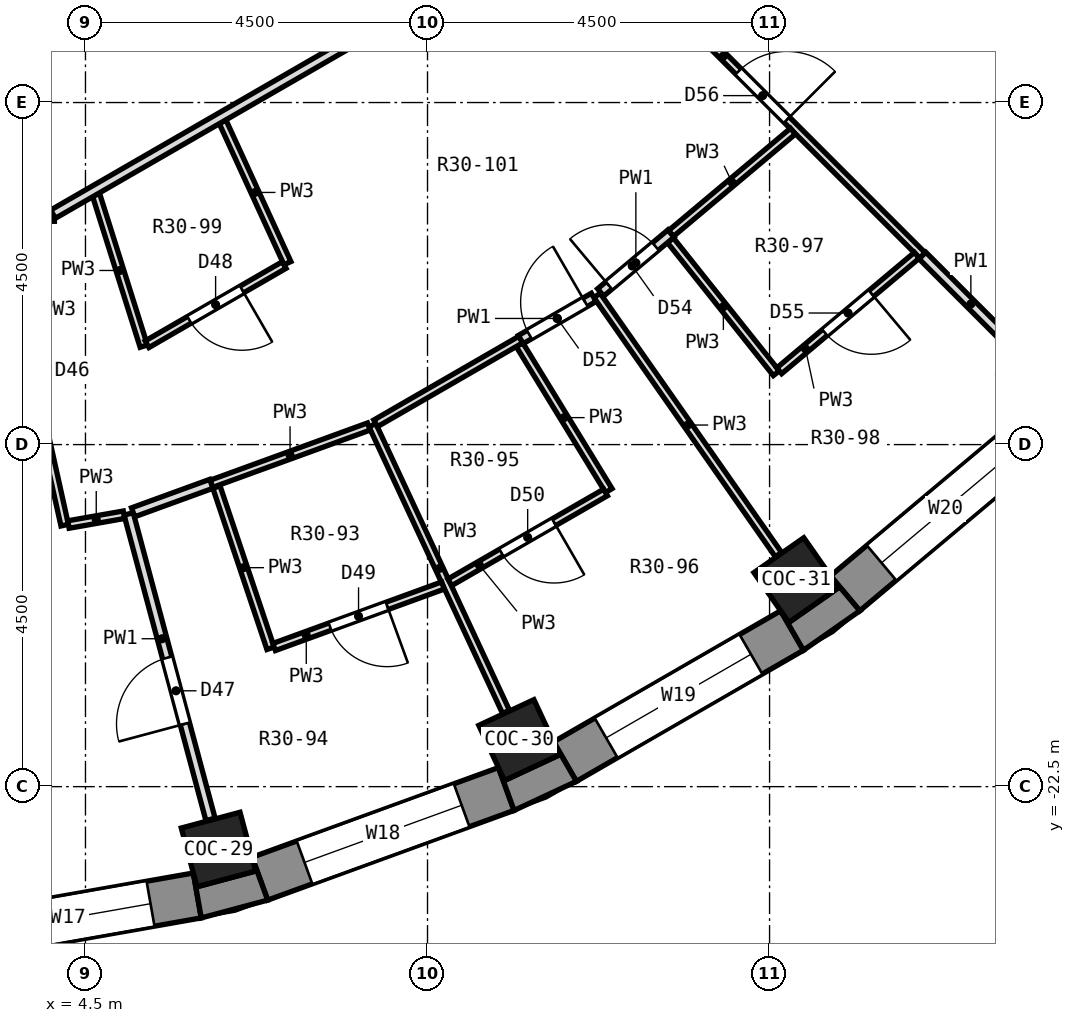
"""IFC4 building model, lengths in metres.
Left out: names, types, materials, properties, quantities, classifications, styles, units other than length and angle.
Written with IfcOpenShell. Run it as: python <this file> out.ifc"""

import sys

from ifc_helpers import new_model, si_unit, direction, frame, frame_2d, origin, origin_2d, place, context, subcontext, project, spatial, polyline, rectangle, outline, extrude, element, fill, save


model = new_model("IFC4")
c1 = context("Model", 3, precision=1e-05, world=origin(), true_north=direction((0.0, 1.0)))
c2 = subcontext(c1, "Body", "Model", "MODEL_VIEW")
j1 = project(units=[si_unit("LENGTHUNIT", "METRE"), si_unit("PLANEANGLEUNIT", "RADIAN")], contexts=[c1])
p1 = place(None, origin())
s1 = spatial("IfcSite", under=j1, at=p1, CompositionType="ELEMENT")
p2 = place(p1, origin())
s2 = spatial("IfcBuilding", under=s1, at=p2, CompositionType="ELEMENT")
p3 = place(p2, frame((0.0, 0.0, 210.3)))
s3 = spatial("IfcBuildingStorey", under=s2, at=p3, CompositionType="ELEMENT", Elevation=210.3)
for number, where, z_axis, x_axis in (
    (1, (6.25, -23.327, 0.0), (0.0, 0.0, 1.0), (0.259, -0.966, 0.0)),
    (2, (10.206, -21.887, 0.0), (0.0, 0.0, 1.0), (0.423, -0.906, 0.0)),
    (3, (13.852, -19.782, 0.0), (0.0, 0.0, 1.0), (0.574, -0.819, 0.0)),
):
    element("IfcColumn", number, at=place(p3, frame(where, z_axis=z_axis, x_axis=x_axis)), inside=s3, PredefinedType="COLUMN", context=c2, shape_type="SweptSolid", body=[
        extrude(rectangle(XDim=0.8, YDim=0.8, at=origin_2d()), origin(), (0.0, 0.0, 1.0), 3.3),
    ])
p4 = place(p3, frame((2.574, -24.531, 0.0), z_axis=(0.0, 0.0, 1.0), x_axis=(0.984814892183, 0.173607684551, 0.0)))
e4 = element("IfcWall", 4, at=p4, inside=s3, PredefinedType="SOLIDWALL", context=c2, shape_type="SweptSolid", body=[
    extrude(rectangle(XDim=3.45, YDim=0.6, at=frame_2d((1.725, 0.0))), origin(), (0.0, 0.0, 1.0), 2.85),
])
p5 = place(p4, frame((0.625, 0.0, 0.9)))
e5 = element("IfcOpeningElement", 5, at=p5, cuts=e4, PredefinedType="OPENING", context=c2, shape_type="SweptSolid", body=[
    extrude(rectangle(XDim=2.2, YDim=1.8, at=frame_2d((1.1, 0.9))), frame((0.0, 0.312, 0.0), z_axis=(0.0, -1.0, 0.0), x_axis=(1.0, 0.0, 0.0)), (0.0, 0.0, 1.0), 0.624),
])
p6 = place(p3, frame((6.794, -23.711, 0.0), z_axis=(0.0, 0.0, 1.0), x_axis=(0.93968799822, 0.342032843455, 0.0)))
e6 = element("IfcWall", 6, at=p6, inside=s3, PredefinedType="SOLIDWALL", context=c2, shape_type="SweptSolid", body=[
    extrude(rectangle(XDim=3.45, YDim=0.6, at=frame_2d((1.725, 0.0))), origin(), (0.0, 0.0, 1.0), 2.85),
])
p7 = place(p6, frame((0.625, 0.0, 0.9)))
e7 = element("IfcOpeningElement", 7, at=p7, cuts=e6, PredefinedType="OPENING", context=c2, shape_type="SweptSolid", body=[
    extrude(rectangle(XDim=2.2, YDim=1.8, at=frame_2d((1.1, 0.9))), frame((0.0, 0.312, 0.0), z_axis=(0.0, -1.0, 0.0), x_axis=(1.0, 0.0, 0.0)), (0.0, 0.0, 1.0), 0.624),
])
p8 = place(p3, frame((10.809, -22.171, 0.0), z_axis=(0.0, 0.0, 1.0), x_axis=(0.86602648383, 0.499998129301, 0.0)))
e8 = element("IfcWall", 8, at=p8, inside=s3, PredefinedType="SOLIDWALL", context=c2, shape_type="SweptSolid", body=[
    extrude(rectangle(XDim=3.45, YDim=0.6, at=frame_2d((1.725, 0.0))), origin(), (0.0, 0.0, 1.0), 2.85),
])
p9 = place(p8, frame((0.625, 0.0, 0.9)))
e9 = element("IfcOpeningElement", 9, at=p9, cuts=e8, PredefinedType="OPENING", context=c2, shape_type="SweptSolid", body=[
    extrude(rectangle(XDim=2.2, YDim=1.8, at=frame_2d((1.1, 0.9))), frame((0.0, 0.312, 0.0), z_axis=(0.0, -1.0, 0.0), x_axis=(1.0, 0.0, 0.0)), (0.0, 0.0, 1.0), 0.624),
])
p10 = place(p3, frame((14.494, -19.957, 0.0), z_axis=(0.0, 0.0, 1.0), x_axis=(0.766058884809, 0.642770398358, 0.0)))
e10 = element("IfcWall", 10, at=p10, inside=s3, PredefinedType="SOLIDWALL", context=c2, shape_type="SweptSolid", body=[
    extrude(rectangle(XDim=3.449, YDim=0.6, at=frame_2d((1.725, 0.0))), origin(), (0.0, 0.0, 1.0), 2.85),
])
p11 = place(p10, frame((0.625, 0.0, 0.9)))
e11 = element("IfcOpeningElement", 11, at=p11, cuts=e10, PredefinedType="OPENING", context=c2, shape_type="SweptSolid", body=[
    extrude(rectangle(XDim=2.2, YDim=1.8, at=frame_2d((1.1, 0.9))), frame((0.0, 0.312, 0.0), z_axis=(0.0, -1.0, 0.0), x_axis=(1.0, 0.0, 0.0)), (0.0, 0.0, 1.0), 0.624),
])
p12 = place(p3, origin())
e12 = element("IfcWall", 12, at=p12, inside=s3, PredefinedType="SOLIDWALL", context=c2, shape_type="SweptSolid", body=[
    extrude(outline(polyline([(6.023, -24.227), (6.897, -23.993), (6.692, -23.429), (6.74, -23.61), (5.968, -23.817), (5.919, -23.636), (6.023, -24.227)])), origin(), (0.0, 0.0, 1.0), 2.85),
])
p13 = place(p3, origin())
e13 = element("IfcWall", 13, at=p13, inside=s3, PredefinedType="SOLIDWALL", context=c2, shape_type="SweptSolid", body=[
    extrude(outline(polyline([(10.959, -22.431), (10.659, -21.911), (10.738, -22.081), (10.013, -22.419), (9.934, -22.249), (10.139, -22.813), (10.959, -22.431)])), origin(), (0.0, 0.0, 1.0), 2.85),
])
p14 = place(p3, origin())
e14 = element("IfcWall", 14, at=p14, inside=s3, PredefinedType="SOLIDWALL", context=c2, shape_type="SweptSolid", body=[
    extrude(outline(polyline([(13.946, -20.706), (14.687, -20.187), (14.302, -19.727), (14.409, -19.881), (13.754, -20.34), (13.646, -20.186), (13.946, -20.706)])), origin(), (0.0, 0.0, 1.0), 2.85),
])
p15 = place(p3, frame((3.338, -15.061, 0.0), z_axis=(0.0, 0.0, 1.0), x_axis=(0.216772684832, -0.976222107469, 0.0)))
e15 = element("IfcWall", 15, at=p15, inside=s3, PredefinedType="PARTITIONING", context=c2, shape_type="SweptSolid", body=[
    extrude(rectangle(XDim=4.096, YDim=0.1, at=frame_2d((2.048, 0.0))), origin(), (0.0, 0.0, 1.0), 2.85),
])
p16 = place(p15, frame((1.566, 0.0, 0.0)))
e16 = element("IfcOpeningElement", 16, at=p16, cuts=e15, PredefinedType="OPENING", context=c2, shape_type="SweptSolid", body=[
    extrude(rectangle(XDim=0.9, YDim=2.1, at=frame_2d((0.45, 1.05))), frame((0.0, 0.062, 0.0), z_axis=(0.0, -1.0, 0.0), x_axis=(1.0, 0.0, 0.0)), (0.0, 0.0, 1.0), 0.124),
])
p17 = place(p3, frame((5.068, -18.912, 0.0), z_axis=(0.0, 0.0, 1.0), x_axis=(0.258780082079, -0.965936265557, 0.0)))
e17 = element("IfcWall", 17, at=p17, inside=s3, PredefinedType="PARTITIONING", context=c2, shape_type="SweptSolid", body=[
    extrude(rectangle(XDim=4.16, YDim=0.125, at=frame_2d((2.08, 0.0))), origin(), (0.0, 0.0, 1.0), 2.85),
])
p18 = place(p17, frame((1.959, 0.0, 0.0)))
e18 = element("IfcOpeningElement", 18, at=p18, cuts=e17, PredefinedType="OPENING", context=c2, shape_type="SweptSolid", body=[
    extrude(rectangle(XDim=0.9, YDim=2.1, at=frame_2d((0.45, 1.05))), frame((0.0, 0.074, 0.0), z_axis=(0.0, -1.0, 0.0), x_axis=(1.0, 0.0, 0.0)), (0.0, 0.0, 1.0), 0.149),
])
p19 = place(p3, frame((4.639, -14.713, 0.0), z_axis=(0.0, 0.0, 1.0), x_axis=(0.300689491928, -0.953722092354, 0.0)))
e19 = element("IfcWall", 19, at=p19, inside=s3, PredefinedType="PARTITIONING", context=c2, shape_type="SweptSolid", body=[
    extrude(rectangle(XDim=2.089, YDim=0.1, at=frame_2d((1.044, 0.0))), origin(), (0.0, 0.0, 1.0), 2.85),
])
p20 = place(p3, frame((6.223, -18.558, 0.0), z_axis=(0.0, 0.0, 1.0), x_axis=(0.318223462583, -0.948015731864, 0.0)))
e20 = element("IfcWall", 20, at=p20, inside=s3, PredefinedType="PARTITIONING", context=c2, shape_type="SweptSolid", body=[
    extrude(rectangle(XDim=2.238, YDim=0.1, at=frame_2d((1.119, 0.0))), origin(), (0.0, 0.0, 1.0), 2.85),
])
p21 = place(p3, frame((6.304, -13.753, 0.0), z_axis=(0.0, 0.0, 1.0), x_axis=(0.41684777826, -0.90897630869, 0.0)))
e21 = element("IfcWall", 21, at=p21, inside=s3, PredefinedType="PARTITIONING", context=c2, shape_type="SweptSolid", body=[
    extrude(rectangle(XDim=2.046, YDim=0.1, at=frame_2d((1.023, 0.0))), origin(), (0.0, 0.0, 1.0), 2.85),
])
p22 = place(p3, frame((8.275, -17.745, 0.0), z_axis=(0.0, 0.0, 1.0), x_axis=(0.42246777717, -0.906377943936, 0.0)))
e22 = element("IfcWall", 22, at=p22, inside=s3, PredefinedType="PARTITIONING", context=c2, shape_type="SweptSolid", body=[
    extrude(rectangle(XDim=4.16, YDim=0.1, at=frame_2d((2.08, 0.0))), origin(), (0.0, 0.0, 1.0), 2.85),
])
p23 = place(p3, frame((10.21, -16.686, 0.0), z_axis=(0.0, 0.0, 1.0), x_axis=(0.522037907824, -0.852922284147, 0.0)))
e23 = element("IfcWall", 23, at=p23, inside=s3, PredefinedType="PARTITIONING", context=c2, shape_type="SweptSolid", body=[
    extrude(rectangle(XDim=2.25, YDim=0.1, at=frame_2d((1.125, 0.0))), origin(), (0.0, 0.0, 1.0), 2.85),
])
p24 = place(p3, frame((11.23, -16.038, 0.0), z_axis=(0.0, 0.0, 1.0), x_axis=(0.573525346877, -0.81918781515, 0.0)))
e24 = element("IfcWall", 24, at=p24, inside=s3, PredefinedType="PARTITIONING", context=c2, shape_type="SweptSolid", body=[
    extrude(rectangle(XDim=4.161, YDim=0.1, at=frame_2d((2.081, 0.0))), origin(), (0.0, 0.0, 1.0), 2.85),
])
p25 = place(p3, frame((12.195, -15.311, 0.0), z_axis=(0.0, 0.0, 1.0), x_axis=(0.623070217722, -0.782165905539, 0.0)))
e25 = element("IfcWall", 25, at=p25, inside=s3, PredefinedType="PARTITIONING", context=c2, shape_type="SweptSolid", body=[
    extrude(rectangle(XDim=2.237, YDim=0.1, at=frame_2d((1.119, 0.0))), origin(), (0.0, 0.0, 1.0), 2.85),
])
p26 = place(p3, frame((10.981, -10.981, 0.0), z_axis=(0.0, 0.0, 1.0), x_axis=(0.707106781187, -0.707106781187, 0.0)))
e26 = element("IfcWall", 26, at=p26, inside=s3, PredefinedType="PARTITIONING", context=c2, shape_type="SweptSolid", body=[
    extrude(rectangle(XDim=6.408, YDim=0.1, at=frame_2d((3.204, 0.0))), origin(), (0.0, 0.0, 1.0), 2.85),
])
p27 = place(p26, frame((2.984, 0.0, 0.0)))
e27 = element("IfcOpeningElement", 27, at=p27, cuts=e26, PredefinedType="OPENING", context=c2, shape_type="SweptSolid", body=[
    extrude(rectangle(XDim=0.9, YDim=2.1, at=frame_2d((0.45, 1.05))), frame((0.0, 0.062, 0.0), z_axis=(0.0, -1.0, 0.0), x_axis=(1.0, 0.0, 0.0)), (0.0, 0.0, 1.0), 0.124),
])
p28 = place(p3, frame((15.511, -15.513, 0.0), z_axis=(0.0, 0.0, 1.0), x_axis=(0.707106781187, -0.707106781187, 0.0)))
e28 = element("IfcWall", 28, at=p28, inside=s3, PredefinedType="PARTITIONING", context=c2, shape_type="SweptSolid", body=[
    extrude(rectangle(XDim=1.802, YDim=0.125, at=frame_2d((0.901, 0.0))), origin(), (0.0, 0.0, 1.0), 2.85),
])
p29 = place(p3, frame((-3.957, -15.0, 0.0), z_axis=(0.0, 0.0, 1.0), x_axis=(1.0, 0.0, 0.0)))
e29 = element("IfcWall", 29, at=p29, inside=s3, PredefinedType="PARTITIONING", context=c2, shape_type="SweptSolid", body=[
    extrude(rectangle(XDim=8.048, YDim=0.125, at=frame_2d((4.024, 0.0))), origin(), (0.0, 0.0, 1.0), 2.85),
])
p30 = place(p29, frame((4.463, 0.0, 0.0)))
e30 = element("IfcOpeningElement", 30, at=p30, cuts=e29, PredefinedType="OPENING", context=c2, shape_type="SweptSolid", body=[
    extrude(rectangle(XDim=1.0, YDim=2.1, at=frame_2d((0.5, 1.05))), frame((0.0, 0.074, 0.0), z_axis=(0.0, -1.0, 0.0), x_axis=(1.0, 0.0, 0.0)), (0.0, 0.0, 1.0), 0.149),
])
p31 = place(p3, frame((4.276, -19.052, 0.0), z_axis=(0.0, 0.0, 1.0), x_axis=(0.984820011125, 0.173578644101, 0.0)))
e31 = element("IfcWall", 31, at=p31, inside=s3, PredefinedType="PARTITIONING", context=c2, shape_type="SweptSolid", body=[
    extrude(rectangle(XDim=0.741, YDim=0.1, at=frame_2d((0.371, 0.0))), origin(), (0.0, 0.0, 1.0), 2.85),
])
p32 = place(p3, frame((6.982, -20.663, 0.0), z_axis=(0.0, 0.0, 1.0), x_axis=(0.939639539443, 0.34216594792, 0.0)))
e32 = element("IfcWall", 32, at=p32, inside=s3, PredefinedType="PARTITIONING", context=c2, shape_type="SweptSolid", body=[
    extrude(rectangle(XDim=2.364, YDim=0.1, at=frame_2d((1.182, 0.0))), origin(), (0.0, 0.0, 1.0), 2.85),
])
p33 = place(p32, frame((0.782, 0.0, 0.0)))
e33 = element("IfcOpeningElement", 33, at=p33, cuts=e32, PredefinedType="OPENING", context=c2, shape_type="SweptSolid", body=[
    extrude(rectangle(XDim=0.8, YDim=2.1, at=frame_2d((0.4, 1.05))), frame((0.0, 0.062, 0.0), z_axis=(0.0, -1.0, 0.0), x_axis=(1.0, 0.0, 0.0)), (0.0, 0.0, 1.0), 0.124),
])
p34 = place(p3, frame((6.156, -18.516, 0.0), z_axis=(0.0, 0.0, 1.0), x_axis=(0.939728749343, 0.341920864613, 0.0)))
e34 = element("IfcWall", 34, at=p34, inside=s3, PredefinedType="PARTITIONING", context=c2, shape_type="SweptSolid", body=[
    extrude(rectangle(XDim=2.205, YDim=0.1, at=frame_2d((1.103, 0.0))), origin(), (0.0, 0.0, 1.0), 2.85),
])
p35 = place(p3, frame((5.127, -18.891, 0.0), z_axis=(0.0, 0.0, 1.0), x_axis=(0.939656692784, 0.342118838573, 0.0)))
e35 = element("IfcWall", 35, at=p35, inside=s3, PredefinedType="PARTITIONING", context=c2, shape_type="SweptSolid", body=[
    extrude(rectangle(XDim=1.095, YDim=0.125, at=frame_2d((0.548, 0.0))), origin(), (0.0, 0.0, 1.0), 2.85),
])
p36 = place(p3, frame((9.293, -19.812, 0.0), z_axis=(0.0, 0.0, 1.0), x_axis=(0.866139183788, 0.49980287545, 0.0)))
e36 = element("IfcWall", 36, at=p36, inside=s3, PredefinedType="PARTITIONING", context=c2, shape_type="SweptSolid", body=[
    extrude(rectangle(XDim=2.365, YDim=0.1, at=frame_2d((1.183, 0.0))), origin(), (0.0, 0.0, 1.0), 2.85),
])
p37 = place(p36, frame((0.782, 0.0, 0.0)))
e37 = element("IfcOpeningElement", 37, at=p37, cuts=e36, PredefinedType="OPENING", context=c2, shape_type="SweptSolid", body=[
    extrude(rectangle(XDim=0.8, YDim=2.1, at=frame_2d((0.4, 1.05))), frame((0.0, 0.062, 0.0), z_axis=(0.0, -1.0, 0.0), x_axis=(1.0, 0.0, 0.0)), (0.0, 0.0, 1.0), 0.124),
])
p38 = place(p3, frame((8.318, -17.72, 0.0), z_axis=(0.0, 0.0, 1.0), x_axis=(0.866039875853, 0.499974932805, 0.0)))
e38 = element("IfcWall", 38, at=p38, inside=s3, PredefinedType="PARTITIONING", context=c2, shape_type="SweptSolid", body=[
    extrude(rectangle(XDim=2.204, YDim=0.1, at=frame_2d((1.102, 0.0))), origin(), (0.0, 0.0, 1.0), 2.85),
])
p39 = place(p3, frame((10.227, -16.618, 0.0), z_axis=(0.0, 0.0, 1.0), x_axis=(0.865642357341, 0.50066286978, 0.0)))
e39 = element("IfcWall", 39, at=p39, inside=s3, PredefinedType="PARTITIONING", context=c2, shape_type="SweptSolid", body=[
    extrude(rectangle(XDim=1.108, YDim=0.125, at=frame_2d((0.554, 0.0))), origin(), (0.0, 0.0, 1.0), 2.85),
])
p40 = place(p39, frame((0.129, 0.0, 0.0)))
e40 = element("IfcOpeningElement", 40, at=p40, cuts=e39, PredefinedType="OPENING", context=c2, shape_type="SweptSolid", body=[
    extrude(rectangle(XDim=0.85, YDim=2.1, at=frame_2d((0.425, 1.05))), frame((0.0, 0.074, 0.0), z_axis=(0.0, -1.0, 0.0), x_axis=(1.0, 0.0, 0.0)), (0.0, 0.0, 1.0), 0.149),
])
p41 = place(p3, frame((5.31, -16.68, 0.0), z_axis=(0.0, 0.0, 1.0), x_axis=(0.865867329874, 0.500273692149, 0.0)))
e41 = element("IfcWall", 41, at=p41, inside=s3, PredefinedType="PARTITIONING", context=c2, shape_type="SweptSolid", body=[
    extrude(rectangle(XDim=2.083, YDim=0.1, at=frame_2d((1.042, 0.0))), origin(), (0.0, 0.0, 1.0), 2.85),
])
p42 = place(p41, frame((0.641, 0.0, 0.0)))
e42 = element("IfcOpeningElement", 42, at=p42, cuts=e41, PredefinedType="OPENING", context=c2, shape_type="SweptSolid", body=[
    extrude(rectangle(XDim=0.8, YDim=2.1, at=frame_2d((0.4, 1.05))), frame((0.0, 0.062, 0.0), z_axis=(0.0, -1.0, 0.0), x_axis=(1.0, 0.0, 0.0)), (0.0, 0.0, 1.0), 0.124),
])
p43 = place(p3, frame((4.073, -14.969, 0.0), z_axis=(0.0, 0.0, 1.0), x_axis=(0.866056845741, 0.499945536979, 0.0)))
e43 = element("IfcWall", 43, at=p43, inside=s3, PredefinedType="PARTITIONING", context=c2, shape_type="SweptSolid", body=[
    extrude(rectangle(XDim=7.926, YDim=0.125, at=frame_2d((3.963, 0.0))), origin(), (0.0, 0.0, 1.0), 2.85),
])
p44 = place(p3, frame((11.278, -15.998, 0.0), z_axis=(0.0, 0.0, 1.0), x_axis=(0.766877941262, 0.641792975348, 0.0)))
e44 = element("IfcWall", 44, at=p44, inside=s3, PredefinedType="PARTITIONING", context=c2, shape_type="SweptSolid", body=[
    extrude(rectangle(XDim=1.208, YDim=0.125, at=frame_2d((0.604, 0.0))), origin(), (0.0, 0.0, 1.0), 2.85),
])
p45 = place(p44, frame((0.142, 0.0, 0.0)))
e45 = element("IfcOpeningElement", 45, at=p45, cuts=e44, PredefinedType="OPENING", context=c2, shape_type="SweptSolid", body=[
    extrude(rectangle(XDim=0.8, YDim=2.1, at=frame_2d((0.4, 1.05))), frame((0.0, 0.074, 0.0), z_axis=(0.0, -1.0, 0.0), x_axis=(1.0, 0.0, 0.0)), (0.0, 0.0, 1.0), 0.149),
])
p46 = place(p3, frame((13.627, -17.029, 0.0), z_axis=(0.0, 0.0, 1.0), x_axis=(0.766091436164, 0.642731601399, 0.0)))
e46 = element("IfcWall", 46, at=p46, inside=s3, PredefinedType="PARTITIONING", context=c2, shape_type="SweptSolid", body=[
    extrude(rectangle(XDim=2.363, YDim=0.1, at=frame_2d((1.182, 0.0))), origin(), (0.0, 0.0, 1.0), 2.85),
])
p47 = place(p46, frame((0.782, 0.0, 0.0)))
e47 = element("IfcOpeningElement", 47, at=p47, cuts=e46, PredefinedType="OPENING", context=c2, shape_type="SweptSolid", body=[
    extrude(rectangle(XDim=0.8, YDim=2.1, at=frame_2d((0.4, 1.05))), frame((0.0, 0.062, 0.0), z_axis=(0.0, -1.0, 0.0), x_axis=(1.0, 0.0, 0.0)), (0.0, 0.0, 1.0), 0.124),
])
p48 = place(p3, frame((12.204, -15.222, 0.0), z_axis=(0.0, 0.0, 1.0), x_axis=(0.766132236748, 0.6426829668, 0.0)))
e48 = element("IfcWall", 48, at=p48, inside=s3, PredefinedType="PARTITIONING", context=c2, shape_type="SweptSolid", body=[
    extrude(rectangle(XDim=2.092, YDim=0.1, at=frame_2d((1.046, 0.0))), origin(), (0.0, 0.0, 1.0), 2.85),
])
p49 = place(p5, origin())
e49 = element("IfcWindow", 49, at=p49, inside=s3, PartitioningType="SINGLE_PANEL", PredefinedType="WINDOW", context=c2, shape_type="SweptSolid", body=[
    extrude(rectangle(XDim=2.2, YDim=1.8, at=frame_2d((1.1, 0.9))), frame((0.0, 0.18, 0.0), z_axis=(0.0, -1.0, 0.0), x_axis=(1.0, 0.0, 0.0)), (0.0, 0.0, 1.0), 0.06),
])
fill(e5, e49)
p50 = place(p7, origin())
e50 = element("IfcWindow", 50, at=p50, inside=s3, PartitioningType="SINGLE_PANEL", PredefinedType="WINDOW", context=c2, shape_type="SweptSolid", body=[
    extrude(rectangle(XDim=2.2, YDim=1.8, at=frame_2d((1.1, 0.9))), frame((0.0, 0.18, 0.0), z_axis=(0.0, -1.0, 0.0), x_axis=(1.0, 0.0, 0.0)), (0.0, 0.0, 1.0), 0.06),
])
fill(e7, e50)
p51 = place(p9, origin())
e51 = element("IfcWindow", 51, at=p51, inside=s3, PartitioningType="SINGLE_PANEL", PredefinedType="WINDOW", context=c2, shape_type="SweptSolid", body=[
    extrude(rectangle(XDim=2.2, YDim=1.8, at=frame_2d((1.1, 0.9))), frame((0.0, 0.18, 0.0), z_axis=(0.0, -1.0, 0.0), x_axis=(1.0, 0.0, 0.0)), (0.0, 0.0, 1.0), 0.06),
])
fill(e9, e51)
p52 = place(p11, origin())
e52 = element("IfcWindow", 52, at=p52, inside=s3, PartitioningType="SINGLE_PANEL", PredefinedType="WINDOW", context=c2, shape_type="SweptSolid", body=[
    extrude(rectangle(XDim=2.2, YDim=1.8, at=frame_2d((1.1, 0.9))), frame((0.0, 0.18, 0.0), z_axis=(0.0, -1.0, 0.0), x_axis=(1.0, 0.0, 0.0)), (0.0, 0.0, 1.0), 0.06),
])
fill(e11, e52)
p53 = place(p18, frame((0.9, 0.0, 0.0), z_axis=(0.0, 0.0, 1.0), x_axis=(-1.0, 0.0, 0.0)))
e53 = element("IfcDoor", 53, at=p53, inside=s3, OperationType="SINGLE_SWING_LEFT", PredefinedType="DOOR", context=c2, shape_type="SweptSolid", body=[
    extrude(rectangle(XDim=0.9, YDim=2.1, at=frame_2d((0.45, 1.05))), frame((0.0, 0.025, 0.0), z_axis=(0.0, -1.0, 0.0), x_axis=(1.0, 0.0, 0.0)), (0.0, 0.0, 1.0), 0.05),
])
fill(e18, e53)
p54 = place(p42, frame((0.8, 0.0, 0.0), z_axis=(0.0, 0.0, 1.0), x_axis=(-1.0, 0.0, 0.0)))
e54 = element("IfcDoor", 54, at=p54, inside=s3, OperationType="SINGLE_SWING_LEFT", PredefinedType="DOOR", context=c2, shape_type="SweptSolid", body=[
    extrude(rectangle(XDim=0.8, YDim=2.1, at=frame_2d((0.4, 1.05))), frame((0.0, 0.025, 0.0), z_axis=(0.0, -1.0, 0.0), x_axis=(1.0, 0.0, 0.0)), (0.0, 0.0, 1.0), 0.05),
])
fill(e42, e54)
p55 = place(p33, frame((0.8, 0.0, 0.0), z_axis=(0.0, 0.0, 1.0), x_axis=(-1.0, 0.0, 0.0)))
e55 = element("IfcDoor", 55, at=p55, inside=s3, OperationType="SINGLE_SWING_LEFT", PredefinedType="DOOR", context=c2, shape_type="SweptSolid", body=[
    extrude(rectangle(XDim=0.8, YDim=2.1, at=frame_2d((0.4, 1.05))), frame((0.0, 0.025, 0.0), z_axis=(0.0, -1.0, 0.0), x_axis=(1.0, 0.0, 0.0)), (0.0, 0.0, 1.0), 0.05),
])
fill(e33, e55)
p56 = place(p37, frame((0.8, 0.0, 0.0), z_axis=(0.0, 0.0, 1.0), x_axis=(-1.0, 0.0, 0.0)))
e56 = element("IfcDoor", 56, at=p56, inside=s3, OperationType="SINGLE_SWING_LEFT", PredefinedType="DOOR", context=c2, shape_type="SweptSolid", body=[
    extrude(rectangle(XDim=0.8, YDim=2.1, at=frame_2d((0.4, 1.05))), frame((0.0, 0.025, 0.0), z_axis=(0.0, -1.0, 0.0), x_axis=(1.0, 0.0, 0.0)), (0.0, 0.0, 1.0), 0.05),
])
fill(e37, e56)
p57 = place(p40, origin())
e57 = element("IfcDoor", 57, at=p57, inside=s3, OperationType="SINGLE_SWING_RIGHT", PredefinedType="DOOR", context=c2, shape_type="SweptSolid", body=[
    extrude(rectangle(XDim=0.85, YDim=2.1, at=frame_2d((0.425, 1.05))), frame((0.0, 0.025, 0.0), z_axis=(0.0, -1.0, 0.0), x_axis=(1.0, 0.0, 0.0)), (0.0, 0.0, 1.0), 0.05),
])
fill(e40, e57)
p58 = place(p45, origin())
e58 = element("IfcDoor", 58, at=p58, inside=s3, OperationType="SINGLE_SWING_LEFT", PredefinedType="DOOR", context=c2, shape_type="SweptSolid", body=[
    extrude(rectangle(XDim=0.8, YDim=2.1, at=frame_2d((0.4, 1.05))), frame((0.0, 0.025, 0.0), z_axis=(0.0, -1.0, 0.0), x_axis=(1.0, 0.0, 0.0)), (0.0, 0.0, 1.0), 0.05),
])
fill(e45, e58)
p59 = place(p47, frame((0.8, 0.0, 0.0), z_axis=(0.0, 0.0, 1.0), x_axis=(-1.0, 0.0, 0.0)))
e59 = element("IfcDoor", 59, at=p59, inside=s3, OperationType="SINGLE_SWING_LEFT", PredefinedType="DOOR", context=c2, shape_type="SweptSolid", body=[
    extrude(rectangle(XDim=0.8, YDim=2.1, at=frame_2d((0.4, 1.05))), frame((0.0, 0.025, 0.0), z_axis=(0.0, -1.0, 0.0), x_axis=(1.0, 0.0, 0.0)), (0.0, 0.0, 1.0), 0.05),
])
fill(e47, e59)
p60 = place(p27, origin())
e60 = element("IfcDoor", 60, at=p60, inside=s3, OperationType="SINGLE_SWING_RIGHT", PredefinedType="DOOR", context=c2, shape_type="SweptSolid", body=[
    extrude(rectangle(XDim=0.9, YDim=2.1, at=frame_2d((0.45, 1.05))), frame((0.0, 0.025, 0.0), z_axis=(0.0, -1.0, 0.0), x_axis=(1.0, 0.0, 0.0)), (0.0, 0.0, 1.0), 0.05),
])
fill(e27, e60)
save(model, sys.argv[1])
